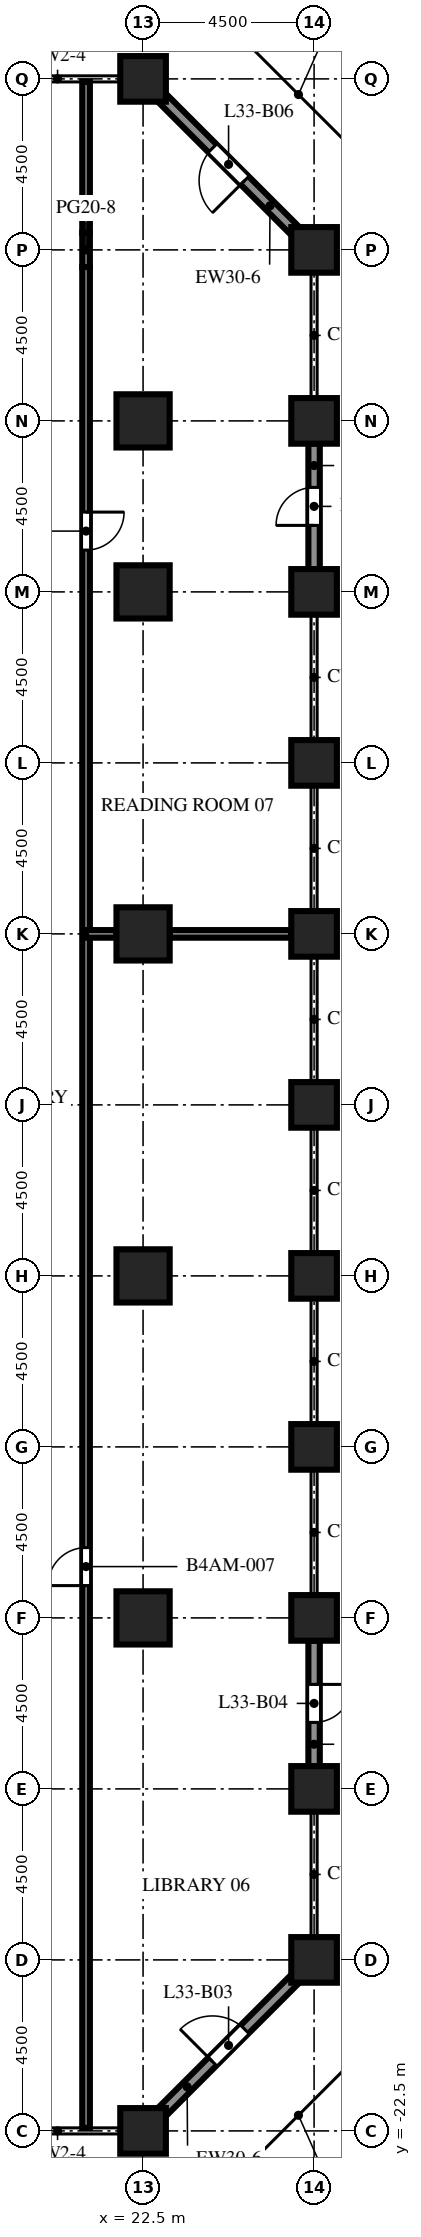
"""IFC4 building model, lengths in metres.
Left out: names, types, materials, properties, quantities, classifications, styles, units other than length and angle.
Written with IfcOpenShell. Run it as: python <this file> out.ifc"""

import sys

from ifc_helpers import new_model, si_unit, direction, frame, frame_2d, origin, origin_2d, place, context, subcontext, project, spatial, rectangle, extrude, element, fill, save


model = new_model("IFC4")
c1 = context("Model", 3, precision=1e-05, world=origin(), true_north=direction((0.0, 1.0)))
c2 = subcontext(c1, "Body", "Model", "MODEL_VIEW")
j1 = project(units=[si_unit("LENGTHUNIT", "METRE"), si_unit("PLANEANGLEUNIT", "RADIAN")], contexts=[c1])
p1 = place(None, origin())
s1 = spatial("IfcSite", under=j1, at=p1, CompositionType="ELEMENT")
p2 = place(p1, origin())
s2 = spatial("IfcBuilding", under=s1, at=p2, CompositionType="ELEMENT")
p3 = place(p2, frame((0.0, 0.0, 145.4)))
s3 = spatial("IfcBuildingStorey", under=s2, at=p3, CompositionType="ELEMENT", Elevation=145.4)
for number, where, z_axis, x_axis in (
    (1, (22.5, -22.5, 0.0), (0.0, 0.0, 1.0), (1.0, 0.0, 0.0)),
    (2, (22.5, 31.5, 0.0), (0.0, 0.0, 1.0), (1.0, 0.0, 0.0)),
    (3, (27.0, -18.0, 0.0), (0.0, 0.0, 1.0), (1.0, 0.0, 0.0)),
    (4, (27.0, -13.5, 0.0), (0.0, 0.0, 1.0), (1.0, 0.0, 0.0)),
    (5, (27.0, -9.0, 0.0), (0.0, 0.0, 1.0), (1.0, 0.0, 0.0)),
    (6, (27.0, -4.5, 0.0), (0.0, 0.0, 1.0), (1.0, 0.0, 0.0)),
    (7, (27.0, 0.0, 0.0), (0.0, 0.0, 1.0), (1.0, 0.0, 0.0)),
    (8, (27.0, 4.5, 0.0), (0.0, 0.0, 1.0), (1.0, 0.0, 0.0)),
    (9, (27.0, 9.0, 0.0), (0.0, 0.0, 1.0), (1.0, 0.0, 0.0)),
    (10, (27.0, 13.5, 0.0), (0.0, 0.0, 1.0), (1.0, 0.0, 0.0)),
    (11, (27.0, 18.0, 0.0), (0.0, 0.0, 1.0), (1.0, 0.0, 0.0)),
    (12, (27.0, 22.5, 0.0), (0.0, 0.0, 1.0), (1.0, 0.0, 0.0)),
):
    element("IfcColumn", number, at=place(p3, frame(where, z_axis=z_axis, x_axis=x_axis)), inside=s3, PredefinedType="COLUMN", context=c2, shape_type="SweptSolid", body=[
        extrude(rectangle(XDim=1.2, YDim=1.2, at=origin_2d()), origin(), (0.0, 0.0, 1.0), 6.0),
    ])
p4 = place(p3, frame((27.0, 27.0, 0.0), z_axis=(0.0, 0.0, 1.0), x_axis=(1.0, 0.0, 0.0)))
e13 = element("IfcColumn", 13, at=p4, inside=s3, PredefinedType="COLUMN", context=c2, shape_type="SweptSolid", body=[
    extrude(rectangle(XDim=1.2, YDim=1.2, at=origin_2d()), origin(), (0.0, 0.0, 1.0), 3.6),
])
for number, where, z_axis, x_axis in (
    (14, (22.5, -9.0, 0.0), (0.0, 0.0, 1.0), (1.0, 0.0, 0.0)),
    (15, (22.5, 0.0, 0.0), (0.0, 0.0, 1.0), (1.0, 0.0, 0.0)),
    (16, (22.5, 9.0, 0.0), (0.0, 0.0, 1.0), (1.0, 0.0, 0.0)),
    (17, (22.5, 18.0, 0.0), (0.0, 0.0, 1.0), (1.0, 0.0, 0.0)),
    (18, (22.5, 22.5, 0.0), (0.0, 0.0, 1.0), (1.0, 0.0, 0.0)),
):
    element("IfcColumn", number, at=place(p3, frame(where, z_axis=z_axis, x_axis=x_axis)), inside=s3, PredefinedType="COLUMN", context=c2, shape_type="SweptSolid", body=[
        extrude(rectangle(XDim=1.4, YDim=1.4, at=origin_2d()), origin(), (0.0, 0.0, 1.0), 6.0),
    ])
p5 = place(p3, frame((26.506, -18.494, 0.0), z_axis=(0.0, 0.0, 1.0), x_axis=(-0.707106781187, -0.707106781187, 0.0)))
e19 = element("IfcWall", 19, at=p5, inside=s3, PredefinedType="SOLIDWALL", context=c2, shape_type="SweptSolid", body=[
    extrude(rectangle(XDim=4.967, YDim=0.3, at=frame_2d((2.483, 0.0))), origin(), (0.0, 0.0, 1.0), 4.5),
])
p6 = place(p5, frame((1.884, 0.0, 0.0)))
e20 = element("IfcOpeningElement", 20, at=p6, cuts=e19, PredefinedType="OPENING", context=c2, shape_type="SweptSolid", body=[
    extrude(rectangle(XDim=1.2, YDim=2.2, at=frame_2d((0.6, 1.1))), frame((0.0, 0.16, 0.0), z_axis=(0.0, -1.0, 0.0), x_axis=(1.0, 0.0, 0.0)), (0.0, 0.0, 1.0), 0.32),
])
p7 = place(p3, frame((27.0, -9.6, 0.0), z_axis=(0.0, 0.0, 1.0), x_axis=(0.0, -1.0, 0.0)))
e21 = element("IfcWall", 21, at=p7, inside=s3, PredefinedType="SOLIDWALL", context=c2, shape_type="SweptSolid", body=[
    extrude(rectangle(XDim=3.3, YDim=0.3, at=frame_2d((1.65, 0.0))), origin(), (0.0, 0.0, 1.0), 4.5),
])
p8 = place(p7, frame((1.15, 0.0, 0.0)))
e22 = element("IfcOpeningElement", 22, at=p8, cuts=e21, PredefinedType="OPENING", context=c2, shape_type="SweptSolid", body=[
    extrude(rectangle(XDim=1.0, YDim=2.2, at=frame_2d((0.5, 1.1))), frame((0.0, 0.16, 0.0), z_axis=(0.0, -1.0, 0.0), x_axis=(1.0, 0.0, 0.0)), (0.0, 0.0, 1.0), 0.32),
])
p9 = place(p3, frame((27.0, 21.9, 0.0), z_axis=(0.0, 0.0, 1.0), x_axis=(0.0, -1.0, 0.0)))
e23 = element("IfcWall", 23, at=p9, inside=s3, PredefinedType="SOLIDWALL", context=c2, shape_type="SweptSolid", body=[
    extrude(rectangle(XDim=3.3, YDim=0.3, at=frame_2d((1.65, 0.0))), origin(), (0.0, 0.0, 1.0), 4.5),
])
p10 = place(p9, frame((1.15, 0.0, 0.0)))
e24 = element("IfcOpeningElement", 24, at=p10, cuts=e23, PredefinedType="OPENING", context=c2, shape_type="SweptSolid", body=[
    extrude(rectangle(XDim=1.0, YDim=2.2, at=frame_2d((0.5, 1.1))), frame((0.0, 0.16, 0.0), z_axis=(0.0, -1.0, 0.0), x_axis=(1.0, 0.0, 0.0)), (0.0, 0.0, 1.0), 0.32),
])
p11 = place(p3, frame((22.994, 31.006, 0.0), z_axis=(0.0, 0.0, 1.0), x_axis=(0.707106781187, -0.707106781187, 0.0)))
e25 = element("IfcWall", 25, at=p11, inside=s3, PredefinedType="SOLIDWALL", context=c2, shape_type="SweptSolid", body=[
    extrude(rectangle(XDim=4.967, YDim=0.3, at=frame_2d((2.483, 0.0))), origin(), (0.0, 0.0, 1.0), 4.5),
])
p12 = place(p11, frame((1.884, 0.0, 0.0)))
e26 = element("IfcOpeningElement", 26, at=p12, cuts=e25, PredefinedType="OPENING", context=c2, shape_type="SweptSolid", body=[
    extrude(rectangle(XDim=1.2, YDim=2.2, at=frame_2d((0.6, 1.1))), frame((0.0, 0.16, 0.0), z_axis=(0.0, -1.0, 0.0), x_axis=(1.0, 0.0, 0.0)), (0.0, 0.0, 1.0), 0.32),
])
p13 = place(p3, frame((21.0, 26.55, 0.0), z_axis=(0.0, 0.0, 1.0), x_axis=(0.0, -1.0, 0.0)))
e27 = element("IfcWall", 27, at=p13, inside=s3, PredefinedType="PARTITIONING", context=c2, shape_type="SweptSolid", body=[
    extrude(rectangle(XDim=48.97, YDim=0.2, at=frame_2d((24.485, 0.0))), origin(), (0.0, 0.0, 1.0), 5.4),
])
p14 = place(p13, frame((33.7, 0.0, 0.0)))
e28 = element("IfcOpeningElement", 28, at=p14, cuts=e27, PredefinedType="OPENING", context=c2, shape_type="SweptSolid", body=[
    extrude(rectangle(XDim=1.0, YDim=2.1, at=frame_2d((0.5, 1.05))), frame((0.0, 0.11, 0.0), z_axis=(0.0, -1.0, 0.0), x_axis=(1.0, 0.0, 0.0)), (0.0, 0.0, 1.0), 0.22),
])
p15 = place(p13, frame((6.45, 0.0, 0.0)))
e29 = element("IfcOpeningElement", 29, at=p15, cuts=e27, PredefinedType="OPENING", context=c2, shape_type="SweptSolid", body=[
    extrude(rectangle(XDim=1.0, YDim=2.1, at=frame_2d((0.5, 1.05))), frame((0.0, 0.11, 0.0), z_axis=(0.0, -1.0, 0.0), x_axis=(1.0, 0.0, 0.0)), (0.0, 0.0, 1.0), 0.22),
])
p16 = place(p3, frame((21.0, 26.55, 0.0), z_axis=(0.0, 0.0, 1.0), x_axis=(0.0, 1.0, 0.0)))
e30 = element("IfcWall", 30, at=p16, inside=s3, PredefinedType="PARTITIONING", context=c2, shape_type="SweptSolid", body=[
    extrude(rectangle(XDim=0.9, YDim=0.2, at=frame_2d((0.45, 0.0))), origin(), (0.0, 0.0, 1.0), 3.57),
])
p17 = place(p3, frame((21.0, 27.45, 0.0), z_axis=(0.0, 0.0, 1.0), x_axis=(0.0, 1.0, 0.0)))
e31 = element("IfcWall", 31, at=p17, inside=s3, PredefinedType="PARTITIONING", context=c2, shape_type="SweptSolid", body=[
    extrude(rectangle(XDim=3.97, YDim=0.2, at=frame_2d((1.985, 0.0))), origin(), (0.0, 0.0, 1.0), 5.4),
])
p18 = place(p3, frame((21.0, 9.0, 0.0), z_axis=(0.0, 0.0, 1.0), x_axis=(1.0, 0.0, 0.0)))
e32 = element("IfcWall", 32, at=p18, inside=s3, PredefinedType="PARTITIONING", context=c2, shape_type="SweptSolid", body=[
    extrude(rectangle(XDim=0.8, YDim=0.2, at=frame_2d((0.4, 0.0))), origin(), (0.0, 0.0, 1.0), 5.4),
])
p19 = place(p3, frame((23.2, 9.0, 0.0), z_axis=(0.0, 0.0, 1.0), x_axis=(1.0, 0.0, 0.0)))
e33 = element("IfcWall", 33, at=p19, inside=s3, PredefinedType="PARTITIONING", context=c2, shape_type="SweptSolid", body=[
    extrude(rectangle(XDim=3.2, YDim=0.2, at=frame_2d((1.6, 0.0))), origin(), (0.0, 0.0, 1.0), 5.4),
])
p20 = place(p6, origin())
e34 = element("IfcDoor", 34, at=p20, inside=s3, OperationType="SINGLE_SWING_RIGHT", PredefinedType="DOOR", context=c2, shape_type="SweptSolid", body=[
    extrude(rectangle(XDim=1.2, YDim=2.2, at=frame_2d((0.6, 1.1))), frame((0.0, 0.025, 0.0), z_axis=(0.0, -1.0, 0.0), x_axis=(1.0, 0.0, 0.0)), (0.0, 0.0, 1.0), 0.05),
])
fill(e20, e34)
p21 = place(p8, origin())
e35 = element("IfcDoor", 35, at=p21, inside=s3, OperationType="SINGLE_SWING_LEFT", PredefinedType="DOOR", context=c2, shape_type="SweptSolid", body=[
    extrude(rectangle(XDim=1.0, YDim=2.2, at=frame_2d((0.5, 1.1))), frame((0.0, 0.025, 0.0), z_axis=(0.0, -1.0, 0.0), x_axis=(1.0, 0.0, 0.0)), (0.0, 0.0, 1.0), 0.05),
])
fill(e22, e35)
p22 = place(p10, origin())
e36 = element("IfcDoor", 36, at=p22, inside=s3, OperationType="SINGLE_SWING_RIGHT", PredefinedType="DOOR", context=c2, shape_type="SweptSolid", body=[
    extrude(rectangle(XDim=1.0, YDim=2.2, at=frame_2d((0.5, 1.1))), frame((0.0, 0.025, 0.0), z_axis=(0.0, -1.0, 0.0), x_axis=(1.0, 0.0, 0.0)), (0.0, 0.0, 1.0), 0.05),
])
fill(e24, e36)
p23 = place(p12, origin())
e37 = element("IfcDoor", 37, at=p23, inside=s3, OperationType="SINGLE_SWING_RIGHT", PredefinedType="DOOR", context=c2, shape_type="SweptSolid", body=[
    extrude(rectangle(XDim=1.2, YDim=2.2, at=frame_2d((0.6, 1.1))), frame((0.0, 0.025, 0.0), z_axis=(0.0, -1.0, 0.0), x_axis=(1.0, 0.0, 0.0)), (0.0, 0.0, 1.0), 0.05),
])
fill(e26, e37)
p24 = place(p14, origin())
e38 = element("IfcDoor", 38, at=p24, inside=s3, OperationType="SINGLE_SWING_RIGHT", PredefinedType="DOOR", context=c2, shape_type="SweptSolid", body=[
    extrude(rectangle(XDim=1.0, YDim=2.1, at=frame_2d((0.5, 1.05))), frame((0.0, 0.025, 0.0), z_axis=(0.0, -1.0, 0.0), x_axis=(1.0, 0.0, 0.0)), (0.0, 0.0, 1.0), 0.05),
])
fill(e28, e38)
p25 = place(p15, origin())
e39 = element("IfcDoor", 39, at=p25, inside=s3, OperationType="SINGLE_SWING_LEFT", PredefinedType="DOOR", context=c2, shape_type="SweptSolid", body=[
    extrude(rectangle(XDim=1.0, YDim=2.1, at=frame_2d((0.5, 1.05))), frame((0.0, 0.025, 0.0), z_axis=(0.0, -1.0, 0.0), x_axis=(1.0, 0.0, 0.0)), (0.0, 0.0, 1.0), 0.05),
])
fill(e29, e39)
save(model, sys.argv[1])
